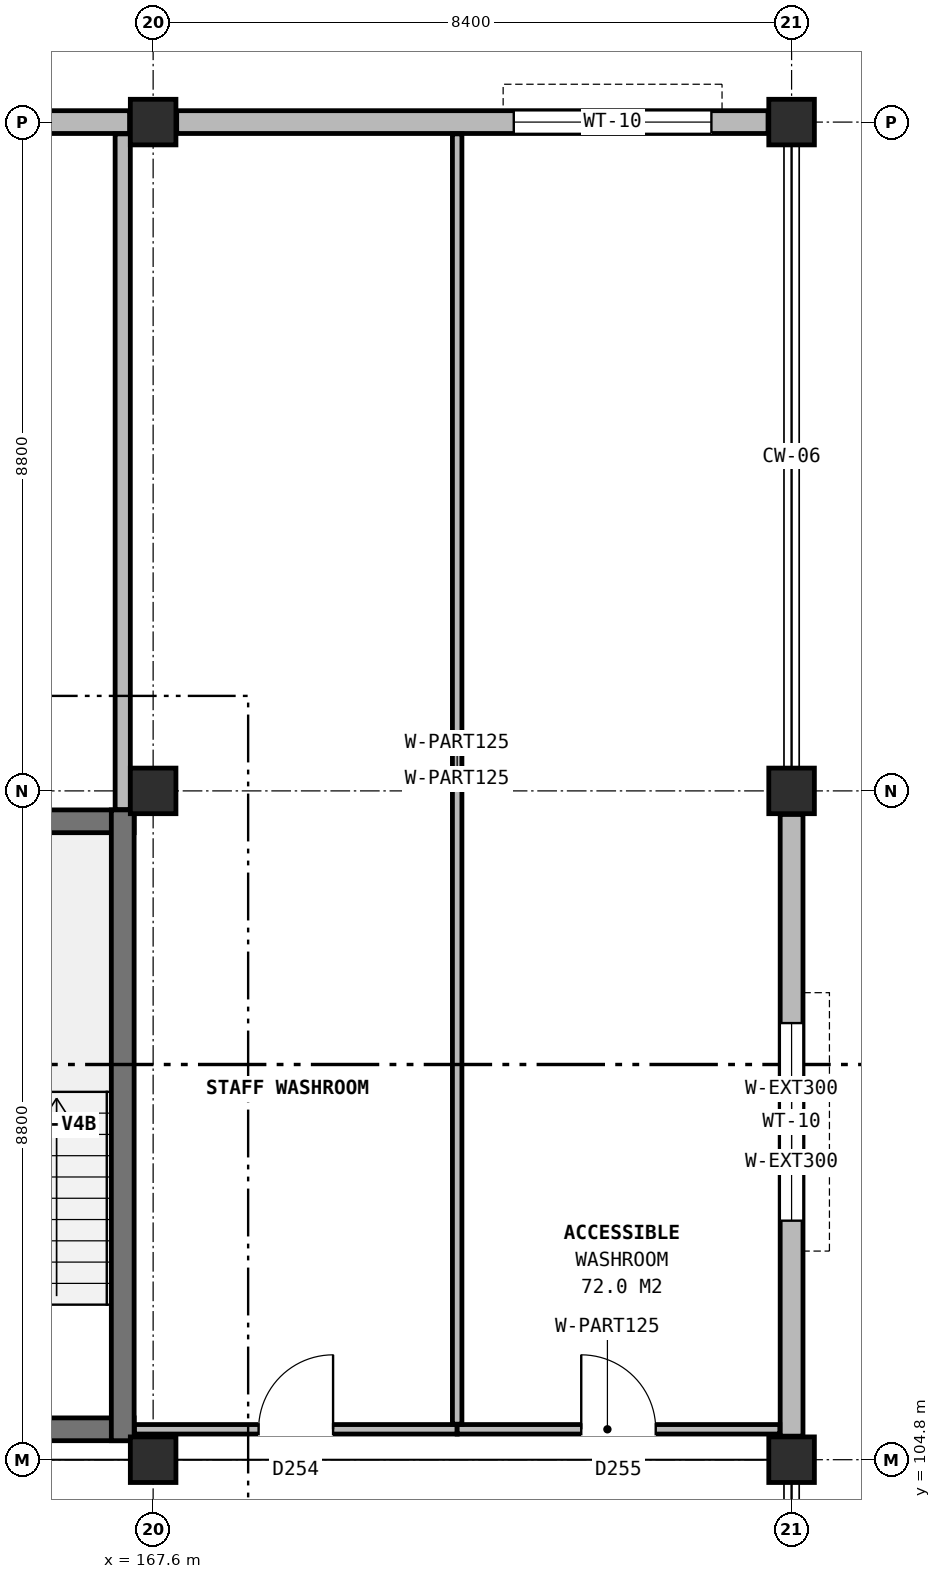
"""IFC4 building model, lengths in metres.
Left out: names, types, materials, properties, quantities, classifications, styles, units other than length and angle.
Written with IfcOpenShell. Run it as: python <this file> out.ifc"""

import sys

from ifc_helpers import new_model, si_unit, direction, frame, frame_2d, origin, origin_2d, place, context, subcontext, project, spatial, rectangle, extrude, element, fill, save


model = new_model("IFC4")
c1 = context("Model", 3, precision=1e-05, world=origin(), true_north=direction((0.0, 1.0)))
c2 = subcontext(c1, "Body", "Model", "MODEL_VIEW")
j1 = project(units=[si_unit("LENGTHUNIT", "METRE"), si_unit("PLANEANGLEUNIT", "RADIAN")], contexts=[c1])
p1 = place(None, origin())
s1 = spatial("IfcSite", under=j1, at=p1, CompositionType="ELEMENT")
p2 = place(p1, origin())
s2 = spatial("IfcBuilding", under=s1, at=p2, CompositionType="ELEMENT")
p3 = place(p2, frame((0.0, 0.0, 44.4)))
s3 = spatial("IfcBuildingStorey", under=s2, at=p3, CompositionType="ELEMENT", Elevation=44.4)
for number, where, z_axis, x_axis in (
    (1, (167.6, 104.8, 0.0), (0.0, 0.0, 1.0), (1.0, 0.0, 0.0)),
    (2, (167.6, 113.6, 0.0), (0.0, 0.0, 1.0), (1.0, 0.0, 0.0)),
    (3, (167.6, 122.4, 0.0), (0.0, 0.0, 1.0), (1.0, 0.0, 0.0)),
    (4, (176.0, 104.8, 0.0), (0.0, 0.0, 1.0), (1.0, 0.0, 0.0)),
    (5, (176.0, 113.6, 0.0), (0.0, 0.0, 1.0), (1.0, 0.0, 0.0)),
    (6, (176.0, 122.4, 0.0), (0.0, 0.0, 1.0), (1.0, 0.0, 0.0)),
):
    element("IfcColumn", number, at=place(p3, frame(where, z_axis=z_axis, x_axis=x_axis)), inside=s3, PredefinedType="COLUMN", context=c2, shape_type="SweptSolid", body=[
        extrude(rectangle(XDim=0.6, YDim=0.6, at=origin_2d()), origin(), (0.0, 0.0, 1.0), 3.8),
    ])
p4 = place(p3, frame((176.0, 105.11, 0.0), z_axis=(0.0, 0.0, 1.0), x_axis=(0.0, 1.0, 0.0)))
e7 = element("IfcWall", 7, at=p4, inside=s3, PredefinedType="SOLIDWALL", context=c2, shape_type="SweptSolid", body=[
    extrude(rectangle(XDim=8.18, YDim=0.3, at=frame_2d((4.09, 0.0))), origin(), (0.0, 0.0, 1.0), 3.05),
])
p5 = place(p4, frame((2.835, 0.0, 0.9)))
e8 = element("IfcOpeningElement", 8, at=p5, cuts=e7, PredefinedType="OPENING", context=c2, shape_type="SweptSolid", body=[
    extrude(rectangle(XDim=2.6, YDim=2.0, at=frame_2d((1.3, 1.0))), frame((0.0, 0.16, 0.0), z_axis=(0.0, -1.0, 0.0), x_axis=(1.0, 0.0, 0.0)), (0.0, 0.0, 1.0), 0.32),
])
p6 = place(p3, frame((175.69, 122.4, 0.0), z_axis=(0.0, 0.0, 1.0), x_axis=(-1.0, 0.0, 0.0)))
e9 = element("IfcWall", 9, at=p6, inside=s3, PredefinedType="SOLIDWALL", context=c2, shape_type="SweptSolid", body=[
    extrude(rectangle(XDim=7.78, YDim=0.3, at=frame_2d((3.89, 0.0))), origin(), (0.0, 0.0, 1.0), 3.05),
])
p7 = place(p6, frame((0.745, 0.0, 0.9)))
e10 = element("IfcOpeningElement", 10, at=p7, cuts=e9, PredefinedType="OPENING", context=c2, shape_type="SweptSolid", body=[
    extrude(rectangle(XDim=2.6, YDim=2.0, at=frame_2d((1.3, 1.0))), frame((0.0, 0.16, 0.0), z_axis=(0.0, -1.0, 0.0), x_axis=(1.0, 0.0, 0.0)), (0.0, 0.0, 1.0), 0.32),
])
p8 = place(p3, frame((167.29, 122.4, 0.0), z_axis=(0.0, 0.0, 1.0), x_axis=(-1.0, 0.0, 0.0)))
e11 = element("IfcWall", 11, at=p8, inside=s3, PredefinedType="SOLIDWALL", context=c2, shape_type="SweptSolid", body=[
    extrude(rectangle(XDim=7.78, YDim=0.3, at=frame_2d((3.89, 0.0))), origin(), (0.0, 0.0, 1.0), 3.05),
])
p9 = place(p8, frame((2.635, 0.0, 0.9)))
e12 = element("IfcOpeningElement", 12, at=p9, cuts=e11, PredefinedType="OPENING", context=c2, shape_type="SweptSolid", body=[
    extrude(rectangle(XDim=2.6, YDim=2.0, at=frame_2d((1.3, 1.0))), frame((0.0, 0.16, 0.0), z_axis=(0.0, -1.0, 0.0), x_axis=(1.0, 0.0, 0.0)), (0.0, 0.0, 1.0), 0.32),
])
p10 = place(p3, frame((163.75, 105.2, 0.0), z_axis=(0.0, 0.0, 1.0), x_axis=(1.0, 0.0, 0.0)))
e13 = element("IfcWall", 13, at=p10, inside=s3, PredefinedType="SHEAR", context=c2, shape_type="SweptSolid", body=[
    extrude(rectangle(XDim=3.6, YDim=0.3, at=frame_2d((1.8, 0.0))), origin(), (0.0, 0.0, 1.0), 3.8),
])
p11 = place(p10, frame((1.05, 0.0, 0.0)))
e14 = element("IfcOpeningElement", 14, at=p11, cuts=e13, PredefinedType="OPENING", context=c2, shape_type="SweptSolid", body=[
    extrude(rectangle(XDim=1.1, YDim=2.2, at=frame_2d((0.55, 1.1))), frame((0.0, 0.16, 0.0), z_axis=(0.0, -1.0, 0.0), x_axis=(1.0, 0.0, 0.0)), (0.0, 0.0, 1.0), 0.32),
])
p12 = place(p3, frame((163.75, 113.2, 0.0), z_axis=(0.0, 0.0, 1.0), x_axis=(1.0, 0.0, 0.0)))
e15 = element("IfcWall", 15, at=p12, inside=s3, PredefinedType="SHEAR", context=c2, shape_type="SweptSolid", body=[
    extrude(rectangle(XDim=3.6, YDim=0.3, at=frame_2d((1.8, 0.0))), origin(), (0.0, 0.0, 1.0), 3.8),
])
p13 = place(p3, frame((167.2, 105.05, 0.0), z_axis=(0.0, 0.0, 1.0), x_axis=(0.0, 1.0, 0.0)))
e16 = element("IfcWall", 16, at=p13, inside=s3, PredefinedType="SHEAR", context=c2, shape_type="SweptSolid", body=[
    extrude(rectangle(XDim=8.3, YDim=0.3, at=frame_2d((4.15, 0.0))), origin(), (0.0, 0.0, 1.0), 3.8),
])
p14 = place(p3, frame((167.355, 105.2, 0.0), z_axis=(0.0, 0.0, 1.0), x_axis=(1.0, 0.0, 0.0)))
e17 = element("IfcWall", 17, at=p14, inside=s3, PredefinedType="PARTITIONING", context=c2, shape_type="SweptSolid", body=[
    extrude(rectangle(XDim=4.245, YDim=0.125, at=frame_2d((2.123, 0.0))), origin(), (0.0, 0.0, 1.0), 3.045),
])
p15 = place(p14, frame((1.633, 0.0, 0.0)))
e18 = element("IfcOpeningElement", 18, at=p15, cuts=e17, PredefinedType="OPENING", context=c2, shape_type="SweptSolid", body=[
    extrude(rectangle(XDim=0.98, YDim=2.1, at=frame_2d((0.49, 1.05))), frame((0.0, 0.073, 0.0), z_axis=(0.0, -1.0, 0.0), x_axis=(1.0, 0.0, 0.0)), (0.0, 0.0, 1.0), 0.145),
])
p16 = place(p3, frame((171.6, 105.2, 0.0), z_axis=(0.0, 0.0, 1.0), x_axis=(1.0, 0.0, 0.0)))
e19 = element("IfcWall", 19, at=p16, inside=s3, PredefinedType="PARTITIONING", context=c2, shape_type="SweptSolid", body=[
    extrude(rectangle(XDim=4.245, YDim=0.125, at=frame_2d((2.123, 0.0))), origin(), (0.0, 0.0, 1.0), 3.045),
])
p17 = place(p16, frame((1.633, 0.0, 0.0)))
e20 = element("IfcOpeningElement", 20, at=p17, cuts=e19, PredefinedType="OPENING", context=c2, shape_type="SweptSolid", body=[
    extrude(rectangle(XDim=0.98, YDim=2.1, at=frame_2d((0.49, 1.05))), frame((0.0, 0.073, 0.0), z_axis=(0.0, -1.0, 0.0), x_axis=(1.0, 0.0, 0.0)), (0.0, 0.0, 1.0), 0.145),
])
p18 = place(p3, frame((167.2, 113.355, 0.0), z_axis=(0.0, 0.0, 1.0), x_axis=(0.0, 1.0, 0.0)))
e21 = element("IfcWall", 21, at=p18, inside=s3, PredefinedType="PARTITIONING", context=c2, shape_type="SweptSolid", body=[
    extrude(rectangle(XDim=8.89, YDim=0.2, at=frame_2d((4.445, 0.0))), origin(), (0.0, 0.0, 1.0), 3.045),
])
p19 = place(p3, frame((171.6, 105.268, 0.0), z_axis=(0.0, 0.0, 1.0), x_axis=(0.0, 1.0, 0.0)))
e22 = element("IfcWall", 22, at=p19, inside=s3, PredefinedType="PARTITIONING", context=c2, shape_type="SweptSolid", body=[
    extrude(rectangle(XDim=16.978, YDim=0.125, at=frame_2d((8.489, 0.0))), origin(), (0.0, 0.0, 1.0), 3.465),
])
p20 = place(p5, origin())
e23 = element("IfcWindow", 23, at=p20, inside=s3, PartitioningType="SINGLE_PANEL", PredefinedType="WINDOW", context=c2, shape_type="SweptSolid", body=[
    extrude(rectangle(XDim=2.6, YDim=2.0, at=frame_2d((1.3, 1.0))), frame((0.0, 0.03, 0.0), z_axis=(0.0, -1.0, 0.0), x_axis=(1.0, 0.0, 0.0)), (0.0, 0.0, 1.0), 0.06),
])
fill(e8, e23)
p21 = place(p7, origin())
e24 = element("IfcWindow", 24, at=p21, inside=s3, PartitioningType="SINGLE_PANEL", PredefinedType="WINDOW", context=c2, shape_type="SweptSolid", body=[
    extrude(rectangle(XDim=2.6, YDim=2.0, at=frame_2d((1.3, 1.0))), frame((0.0, 0.03, 0.0), z_axis=(0.0, -1.0, 0.0), x_axis=(1.0, 0.0, 0.0)), (0.0, 0.0, 1.0), 0.06),
])
fill(e10, e24)
p22 = place(p15, origin())
e25 = element("IfcDoor", 25, at=p22, inside=s3, OperationType="SINGLE_SWING_RIGHT", PredefinedType="DOOR", context=c2, shape_type="SweptSolid", body=[
    extrude(rectangle(XDim=0.98, YDim=2.1, at=frame_2d((0.49, 1.05))), frame((0.0, 0.025, 0.0), z_axis=(0.0, -1.0, 0.0), x_axis=(1.0, 0.0, 0.0)), (0.0, 0.0, 1.0), 0.05),
])
fill(e18, e25)
p23 = place(p17, origin())
e26 = element("IfcDoor", 26, at=p23, inside=s3, OperationType="SINGLE_SWING_LEFT", PredefinedType="DOOR", context=c2, shape_type="SweptSolid", body=[
    extrude(rectangle(XDim=0.98, YDim=2.1, at=frame_2d((0.49, 1.05))), frame((0.0, 0.025, 0.0), z_axis=(0.0, -1.0, 0.0), x_axis=(1.0, 0.0, 0.0)), (0.0, 0.0, 1.0), 0.05),
])
fill(e20, e26)
save(model, sys.argv[1])
